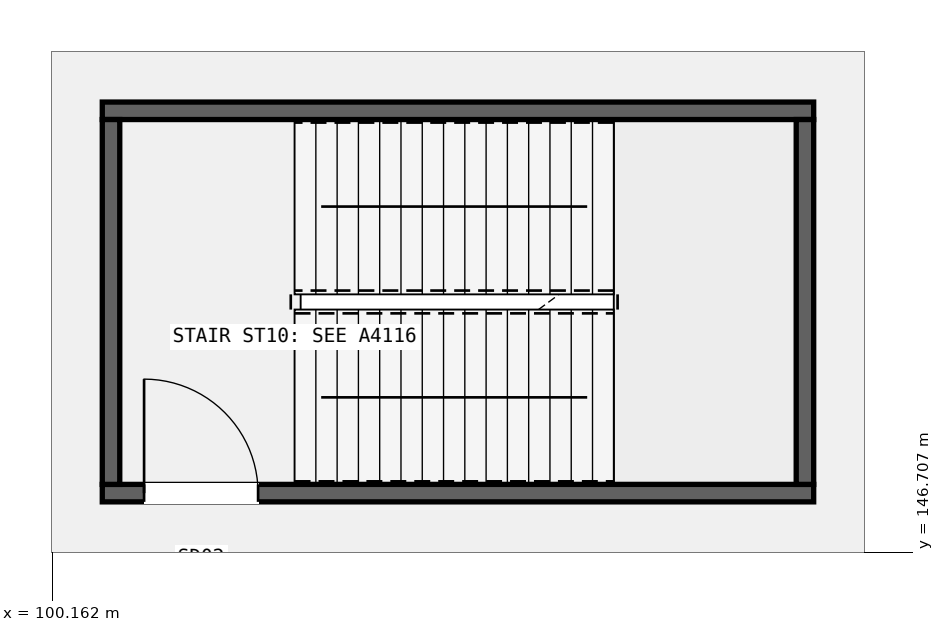
"""IFC4 building model, lengths in metres.
Left out: names, types, materials, properties, quantities, classifications, styles, units other than length and angle.
Written with IfcOpenShell. Run it as: python <this file> out.ifc"""

import sys

from ifc_helpers import new_model, si_unit, direction, frame, frame_2d, origin, place, context, subcontext, project, spatial, rectangle, extrude, element, fill, save


model = new_model("IFC4")
c1 = context("Model", 3, precision=1e-05, world=origin(), true_north=direction((0.0, 1.0)))
c2 = subcontext(c1, "Body", "Model", "MODEL_VIEW")
j1 = project(units=[si_unit("LENGTHUNIT", "METRE"), si_unit("PLANEANGLEUNIT", "RADIAN")], contexts=[c1])
p1 = place(None, origin())
s1 = spatial("IfcSite", under=j1, at=p1, CompositionType="ELEMENT")
p2 = place(p1, origin())
s2 = spatial("IfcBuilding", under=s1, at=p2, CompositionType="ELEMENT")
p3 = place(p2, frame((0.0, 0.0, 20.4)))
s3 = spatial("IfcBuildingStorey", under=s2, at=p3, CompositionType="ELEMENT", Elevation=20.4)
p4 = place(p3, frame((100.82, 147.485, 0.0), z_axis=(0.0, 0.0, 1.0), x_axis=(1.0, 0.0, 0.0)))
e1 = element("IfcWall", 1, at=p4, inside=s3, PredefinedType="SHEAR", context=c2, shape_type="SweptSolid", body=[
    extrude(rectangle(XDim=9.36, YDim=0.23, at=frame_2d((4.68, 0.0))), origin(), (0.0, 0.0, 1.0), 5.18),
])
p5 = place(p4, frame((0.55, 0.0, 0.0)))
e2 = element("IfcOpeningElement", 2, at=p5, cuts=e1, PredefinedType="OPENING", context=c2, shape_type="SweptSolid", body=[
    extrude(rectangle(XDim=1.5, YDim=2.2, at=frame_2d((0.75, 1.1))), frame((0.0, 0.125, 0.0), z_axis=(0.0, -1.0, 0.0), x_axis=(1.0, 0.0, 0.0)), (0.0, 0.0, 1.0), 0.25),
])
p6 = place(p3, frame((100.82, 152.515, 0.0), z_axis=(0.0, 0.0, 1.0), x_axis=(1.0, 0.0, 0.0)))
e3 = element("IfcWall", 3, at=p6, inside=s3, PredefinedType="SHEAR", context=c2, shape_type="SweptSolid", body=[
    extrude(rectangle(XDim=9.36, YDim=0.23, at=frame_2d((4.68, 0.0))), origin(), (0.0, 0.0, 1.0), 5.18),
])
for number, where, z_axis, x_axis in (
    (4, (100.935, 147.6, 0.0), (0.0, 0.0, 1.0), (0.0, 1.0, 0.0)),
    (5, (110.065, 147.6, 0.0), (0.0, 0.0, 1.0), (0.0, 1.0, 0.0)),
):
    element("IfcWall", number, at=place(p3, frame(where, z_axis=z_axis, x_axis=x_axis)), inside=s3, PredefinedType="SHEAR", context=c2, shape_type="SweptSolid", body=[
        extrude(rectangle(XDim=4.8, YDim=0.23, at=frame_2d((2.4, 0.0))), origin(), (0.0, 0.0, 1.0), 5.18),
    ])
p7 = place(p5, origin())
e6 = element("IfcDoor", 6, at=p7, inside=s3, OperationType="SINGLE_SWING_LEFT", PredefinedType="DOOR", context=c2, shape_type="SweptSolid", body=[
    extrude(rectangle(XDim=1.5, YDim=2.2, at=frame_2d((0.75, 1.1))), frame((0.0, 0.025, 0.0), z_axis=(0.0, -1.0, 0.0), x_axis=(1.0, 0.0, 0.0)), (0.0, 0.0, 1.0), 0.05),
])
fill(e2, e6)
save(model, sys.argv[1])
